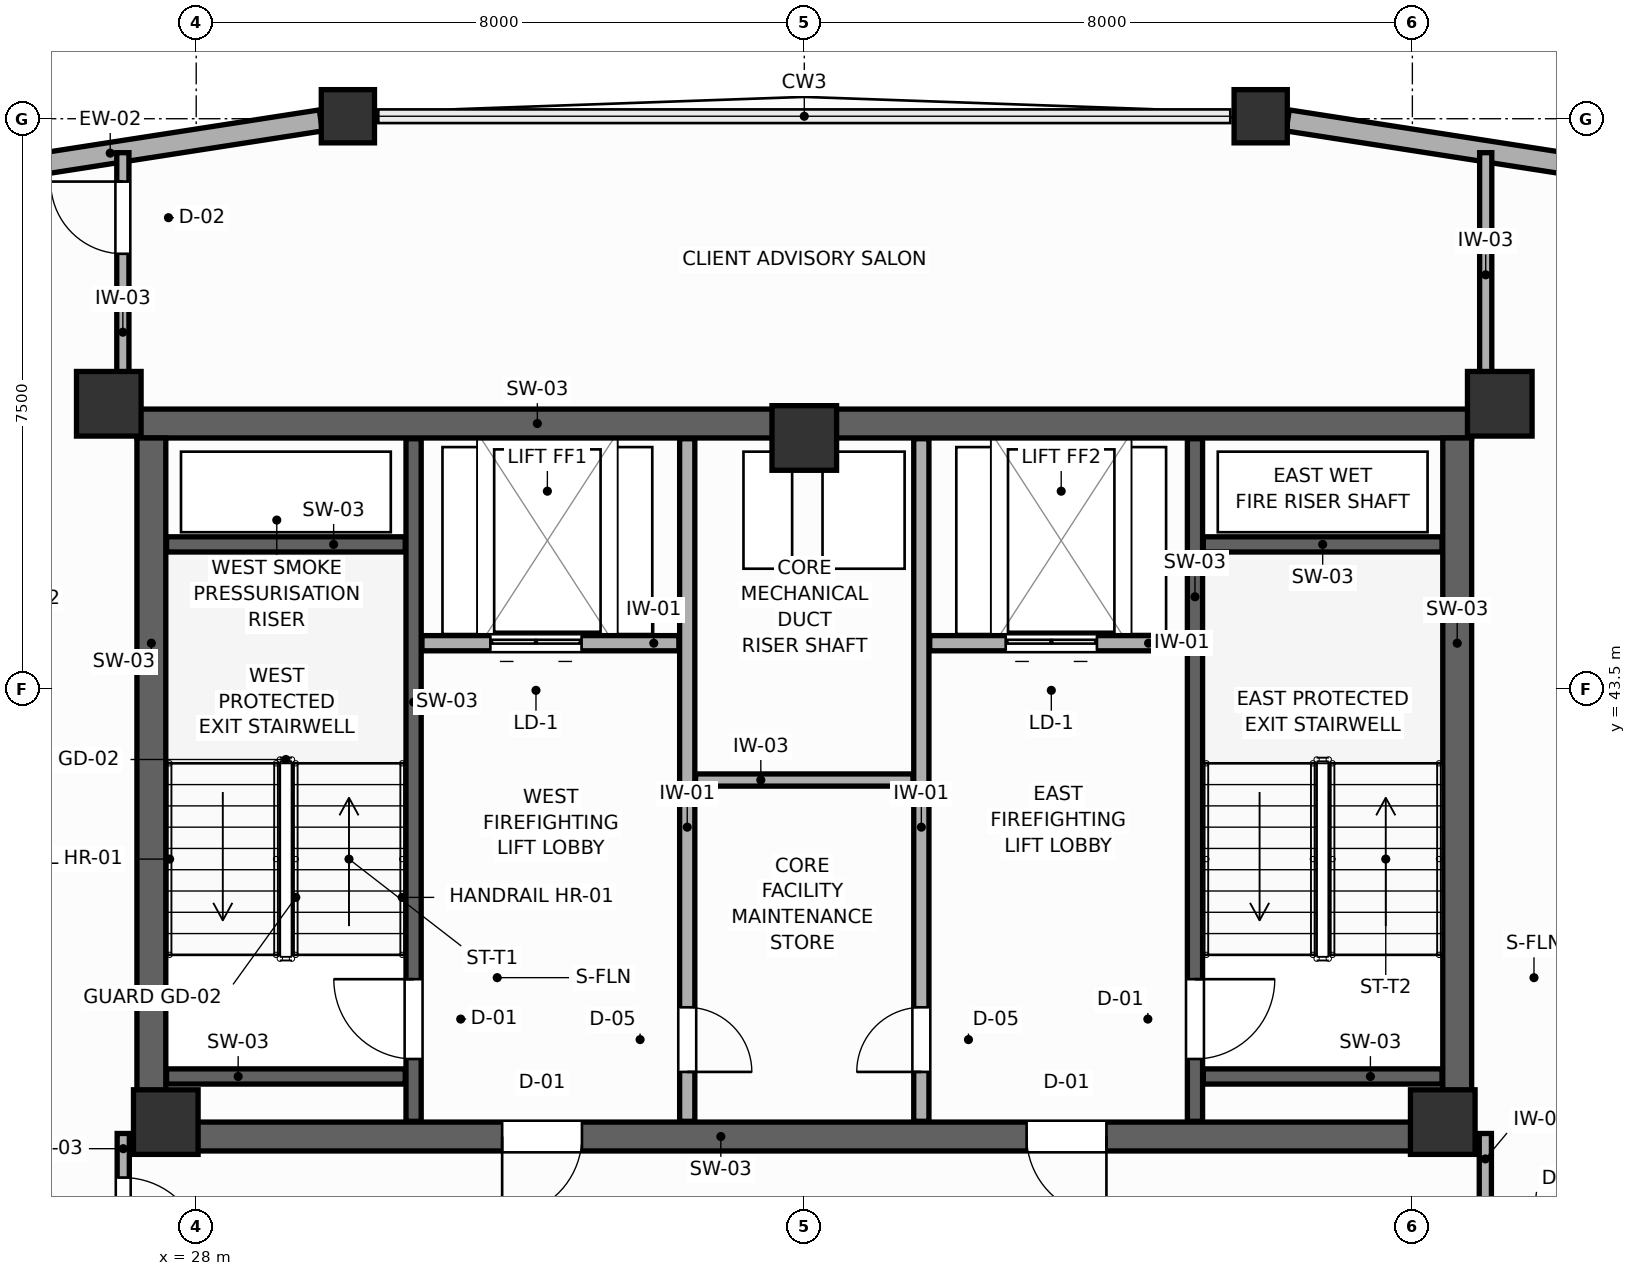
"""IFC4 building model, lengths in metres.
Left out: names, types, materials, properties, quantities, classifications, styles, units other than length and angle.
Written with IfcOpenShell. Run it as: python <this file> out.ifc"""

import sys

from ifc_helpers import new_model, si_unit, direction, frame, frame_2d, origin, origin_2d, place, context, subcontext, project, spatial, rectangle, extrude, source, transform, mapped, element, fill, save


model = new_model("IFC4")
c1 = context("Model", 3, precision=1e-05, world=origin(), true_north=direction((0.0, 1.0)))
c2 = subcontext(c1, "Body", "Model", "MODEL_VIEW")
j1 = project(units=[si_unit("LENGTHUNIT", "METRE"), si_unit("PLANEANGLEUNIT", "RADIAN")], contexts=[c1])
p1 = place(None, origin())
s1 = spatial("IfcSite", under=j1, at=p1, CompositionType="ELEMENT")
p2 = place(p1, origin())
s2 = spatial("IfcBuilding", under=s1, at=p2, CompositionType="ELEMENT")
p3 = place(p2, frame((0.0, 0.0, 246.6)))
s3 = spatial("IfcBuildingStorey", under=s2, at=p3, CompositionType="ELEMENT", Elevation=246.6)
p4 = place(p3, frame((27.22, 46.99, 0.0), z_axis=(0.0, 0.0, 1.0), x_axis=(1.0, 0.0, 0.0)))
e1 = element("IfcWall", 1, at=p4, inside=s3, PredefinedType="SHEAR", context=c2, shape_type="SweptSolid", body=[
    extrude(rectangle(XDim=17.56, YDim=0.38, at=frame_2d((8.78, 0.0))), origin(), (0.0, 0.0, 1.0), 3.6),
])
p5 = place(p3, frame((27.22, 37.61, 0.0), z_axis=(0.0, 0.0, 1.0), x_axis=(1.0, 0.0, 0.0)))
e2 = element("IfcWall", 2, at=p5, inside=s3, PredefinedType="SHEAR", context=c2, shape_type="SweptSolid", body=[
    extrude(rectangle(XDim=17.56, YDim=0.38, at=frame_2d((8.78, 0.0))), origin(), (0.0, 0.0, 1.0), 3.6),
])
p6 = place(p5, frame((4.805, 0.0, 0.0)))
e3 = element("IfcOpeningElement", 3, at=p6, cuts=e2, PredefinedType="OPENING", context=c2, shape_type="SweptSolid", body=[
    extrude(rectangle(XDim=1.05, YDim=2.1, at=frame_2d((0.525, 1.05))), frame((0.0, 0.2, 0.0), z_axis=(0.0, -1.0, 0.0), x_axis=(1.0, 0.0, 0.0)), (0.0, 0.0, 1.0), 0.4),
])
p7 = place(p5, frame((11.705, 0.0, 0.0)))
e4 = element("IfcOpeningElement", 4, at=p7, cuts=e2, PredefinedType="OPENING", context=c2, shape_type="SweptSolid", body=[
    extrude(rectangle(XDim=1.05, YDim=2.1, at=frame_2d((0.525, 1.05))), frame((0.0, 0.2, 0.0), z_axis=(0.0, -1.0, 0.0), x_axis=(1.0, 0.0, 0.0)), (0.0, 0.0, 1.0), 0.4),
])
for number, where, z_axis, x_axis in (
    (5, (27.41, 37.8, 0.0), (0.0, 0.0, 1.0), (0.0, 1.0, 0.0)),
    (6, (44.59, 37.8, 0.0), (0.0, 0.0, 1.0), (0.0, 1.0, 0.0)),
):
    element("IfcWall", number, at=place(p3, frame(where, z_axis=z_axis, x_axis=x_axis)), inside=s3, PredefinedType="SHEAR", context=c2, shape_type="SweptSolid", body=[
        extrude(rectangle(XDim=9.0, YDim=0.38, at=frame_2d((4.5, 0.0))), origin(), (0.0, 0.0, 1.0), 3.6),
    ])
m1 = source(origin(), c2, "Body", "SweptSolid", [
    extrude(rectangle(XDim=0.85, YDim=0.85, at=origin_2d()), origin(), (0.0, 0.0, 1.0), 3.6),
])
for number, where, z_axis, x_axis in (
    (7, (26.85, 47.25, 0.0), (0.0, 0.0, 1.0), (1.0, 0.0, 0.0)),
    (8, (45.15, 47.25, 0.0), (0.0, 0.0, 1.0), (1.0, 0.0, 0.0)),
    (9, (27.6, 37.8, 0.0), (0.0, 0.0, 1.0), (1.0, 0.0, 0.0)),
    (10, (44.4, 37.8, 0.0), (0.0, 0.0, 1.0), (1.0, 0.0, 0.0)),
    (11, (36.0, 46.8, 0.0), (0.0, 0.0, 1.0), (1.0, 0.0, 0.0)),
):
    element("IfcColumn", number, at=place(p3, frame(where, z_axis=z_axis, x_axis=x_axis)), inside=s3, PredefinedType="COLUMN", context=c2, shape_type="MappedRepresentation", body=[
        mapped(m1, transform((0.0, 0.0, 0.0), scale=1.0)),
    ])
m2 = source(origin(), c2, "Body", "SweptSolid", [
    extrude(rectangle(XDim=0.7, YDim=0.7, at=origin_2d()), origin(), (0.0, 0.0, 1.0), 3.6),
])
for number, where, z_axis, x_axis in (
    (12, (42.004, 51.033, 0.0), (0.0, 0.0, 1.0), (1.0, 0.0, 0.0)),
    (13, (29.996, 51.033, 0.0), (0.0, 0.0, 1.0), (1.0, 0.0, 0.0)),
):
    element("IfcColumn", number, at=place(p3, frame(where, z_axis=z_axis, x_axis=x_axis)), inside=s3, PredefinedType="COLUMN", context=c2, shape_type="MappedRepresentation", body=[
        mapped(m2, transform((0.0, 0.0, 0.0), scale=1.0)),
    ])
p8 = place(p3, frame((55.235, 48.979, 0.0), z_axis=(0.0, 0.0, 1.0), x_axis=(-0.988170476673, 0.153359411293, 0.0)))
e14 = element("IfcWall", 14, at=p8, inside=s3, PredefinedType="SOLIDWALL", context=c2, shape_type="SweptSolid", body=[
    extrude(rectangle(XDim=13.03, YDim=0.28, at=frame_2d((6.515, 0.0))), origin(), (0.0, 0.0, 1.0), 3.08),
])
p9 = place(p8, frame((5.79, 0.0, 0.75)))
e15 = element("IfcOpeningElement", 15, at=p9, cuts=e14, PredefinedType="OPENING", context=c2, shape_type="SweptSolid", body=[
    extrude(rectangle(XDim=1.45, YDim=1.65, at=frame_2d((0.725, 0.825))), frame((0.0, 0.15, 0.0), z_axis=(0.0, -1.0, 0.0), x_axis=(1.0, 0.0, 0.0)), (0.0, 0.0, 1.0), 0.3),
])
p10 = place(p3, frame((29.641, 50.978, 0.0), z_axis=(0.0, 0.0, 1.0), x_axis=(-0.988170476673, -0.153359411293, 0.0)))
e16 = element("IfcWall", 16, at=p10, inside=s3, PredefinedType="SOLIDWALL", context=c2, shape_type="SweptSolid", body=[
    extrude(rectangle(XDim=13.03, YDim=0.28, at=frame_2d((6.515, 0.0))), origin(), (0.0, 0.0, 1.0), 3.08),
])
p11 = place(p10, frame((5.79, 0.0, 0.75)))
e17 = element("IfcOpeningElement", 17, at=p11, cuts=e16, PredefinedType="OPENING", context=c2, shape_type="SweptSolid", body=[
    extrude(rectangle(XDim=1.45, YDim=1.65, at=frame_2d((0.725, 0.825))), frame((0.0, 0.15, 0.0), z_axis=(0.0, -1.0, 0.0), x_axis=(1.0, 0.0, 0.0)), (0.0, 0.0, 1.0), 0.3),
])
p12 = place(p3, frame((30.86, 37.81, 0.0), z_axis=(0.0, 0.0, 1.0), x_axis=(0.0, 1.0, 0.0)))
e18 = element("IfcWall", 18, at=p12, inside=s3, PredefinedType="SHEAR", context=c2, shape_type="SweptSolid", body=[
    extrude(rectangle(XDim=8.98, YDim=0.2, at=frame_2d((4.49, 0.0))), origin(), (0.0, 0.0, 1.0), 3.6),
])
p13 = place(p12, frame((0.82, 0.0, 0.0)))
e19 = element("IfcOpeningElement", 19, at=p13, cuts=e18, PredefinedType="OPENING", context=c2, shape_type="SweptSolid", body=[
    extrude(rectangle(XDim=1.05, YDim=2.1, at=frame_2d((0.525, 1.05))), frame((0.0, 0.11, 0.0), z_axis=(0.0, -1.0, 0.0), x_axis=(1.0, 0.0, 0.0)), (0.0, 0.0, 1.0), 0.22),
])
for number, where, z_axis, x_axis in (
    (20, (27.61, 45.4, 0.0), (0.0, 0.0, 1.0), (1.0, 0.0, 0.0)),
    (21, (27.61, 38.4, 0.0), (0.0, 0.0, 1.0), (1.0, 0.0, 0.0)),
):
    element("IfcWall", number, at=place(p3, frame(where, z_axis=z_axis, x_axis=x_axis)), inside=s3, PredefinedType="SHEAR", context=c2, shape_type="SweptSolid", body=[
        extrude(rectangle(XDim=3.14, YDim=0.2, at=frame_2d((1.57, 0.0))), origin(), (0.0, 0.0, 1.0), 3.6),
    ])
p14 = place(p3, frame((41.14, 37.81, 0.0), z_axis=(0.0, 0.0, 1.0), x_axis=(0.0, 1.0, 0.0)))
e22 = element("IfcWall", 22, at=p14, inside=s3, PredefinedType="SHEAR", context=c2, shape_type="SweptSolid", body=[
    extrude(rectangle(XDim=8.98, YDim=0.2, at=frame_2d((4.49, 0.0))), origin(), (0.0, 0.0, 1.0), 3.6),
])
p15 = place(p14, frame((0.82, 0.0, 0.0)))
e23 = element("IfcOpeningElement", 23, at=p15, cuts=e22, PredefinedType="OPENING", context=c2, shape_type="SweptSolid", body=[
    extrude(rectangle(XDim=1.05, YDim=2.1, at=frame_2d((0.525, 1.05))), frame((0.0, 0.11, 0.0), z_axis=(0.0, -1.0, 0.0), x_axis=(1.0, 0.0, 0.0)), (0.0, 0.0, 1.0), 0.22),
])
for number, where, z_axis, x_axis in (
    (24, (41.25, 45.4, 0.0), (0.0, 0.0, 1.0), (1.0, 0.0, 0.0)),
    (25, (41.25, 38.4, 0.0), (0.0, 0.0, 1.0), (1.0, 0.0, 0.0)),
):
    element("IfcWall", number, at=place(p3, frame(where, z_axis=z_axis, x_axis=x_axis)), inside=s3, PredefinedType="SHEAR", context=c2, shape_type="SweptSolid", body=[
        extrude(rectangle(XDim=3.14, YDim=0.2, at=frame_2d((1.57, 0.0))), origin(), (0.0, 0.0, 1.0), 3.6),
    ])
p16 = place(p3, frame((30.97, 44.1, 0.0), z_axis=(0.0, 0.0, 1.0), x_axis=(1.0, 0.0, 0.0)))
e26 = element("IfcWall", 26, at=p16, inside=s3, PredefinedType="PARTITIONING", context=c2, shape_type="SweptSolid", body=[
    extrude(rectangle(XDim=3.38, YDim=0.2, at=frame_2d((1.69, 0.0))), origin(), (0.0, 0.0, 1.0), 3.41),
])
p17 = place(p16, frame((0.9, 0.0, 0.0)))
e27 = element("IfcOpeningElement", 27, at=p17, cuts=e26, PredefinedType="OPENING", context=c2, shape_type="SweptSolid", body=[
    extrude(rectangle(XDim=1.2, YDim=2.1, at=frame_2d((0.6, 1.05))), frame((0.0, 0.11, 0.0), z_axis=(0.0, -1.0, 0.0), x_axis=(1.0, 0.0, 0.0)), (0.0, 0.0, 1.0), 0.22),
])
p18 = place(p3, frame((37.65, 44.1, 0.0), z_axis=(0.0, 0.0, 1.0), x_axis=(1.0, 0.0, 0.0)))
e28 = element("IfcWall", 28, at=p18, inside=s3, PredefinedType="PARTITIONING", context=c2, shape_type="SweptSolid", body=[
    extrude(rectangle(XDim=3.38, YDim=0.2, at=frame_2d((1.69, 0.0))), origin(), (0.0, 0.0, 1.0), 3.41),
])
p19 = place(p18, frame((1.0, 0.0, 0.0)))
e29 = element("IfcOpeningElement", 29, at=p19, cuts=e28, PredefinedType="OPENING", context=c2, shape_type="SweptSolid", body=[
    extrude(rectangle(XDim=1.2, YDim=2.1, at=frame_2d((0.6, 1.05))), frame((0.0, 0.11, 0.0), z_axis=(0.0, -1.0, 0.0), x_axis=(1.0, 0.0, 0.0)), (0.0, 0.0, 1.0), 0.22),
])
p20 = place(p3, frame((34.46, 37.81, 0.0), z_axis=(0.0, 0.0, 1.0), x_axis=(0.0, 1.0, 0.0)))
e30 = element("IfcWall", 30, at=p20, inside=s3, PredefinedType="PARTITIONING", context=c2, shape_type="SweptSolid", body=[
    extrude(rectangle(XDim=8.98, YDim=0.2, at=frame_2d((4.49, 0.0))), origin(), (0.0, 0.0, 1.0), 3.41),
])
p21 = place(p20, frame((0.65, 0.0, 0.0)))
e31 = element("IfcOpeningElement", 31, at=p21, cuts=e30, PredefinedType="OPENING", context=c2, shape_type="SweptSolid", body=[
    extrude(rectangle(XDim=0.85, YDim=2.05, at=frame_2d((0.425, 1.025))), frame((0.0, 0.11, 0.0), z_axis=(0.0, -1.0, 0.0), x_axis=(1.0, 0.0, 0.0)), (0.0, 0.0, 1.0), 0.22),
])
p22 = place(p3, frame((37.54, 37.81, 0.0), z_axis=(0.0, 0.0, 1.0), x_axis=(0.0, 1.0, 0.0)))
e32 = element("IfcWall", 32, at=p22, inside=s3, PredefinedType="PARTITIONING", context=c2, shape_type="SweptSolid", body=[
    extrude(rectangle(XDim=8.98, YDim=0.2, at=frame_2d((4.49, 0.0))), origin(), (0.0, 0.0, 1.0), 3.41),
])
p23 = place(p22, frame((0.65, 0.0, 0.0)))
e33 = element("IfcOpeningElement", 33, at=p23, cuts=e32, PredefinedType="OPENING", context=c2, shape_type="SweptSolid", body=[
    extrude(rectangle(XDim=0.85, YDim=2.05, at=frame_2d((0.425, 1.025))), frame((0.0, 0.11, 0.0), z_axis=(0.0, -1.0, 0.0), x_axis=(1.0, 0.0, 0.0)), (0.0, 0.0, 1.0), 0.22),
])
p24 = place(p3, frame((34.57, 42.3, 0.0), z_axis=(0.0, 0.0, 1.0), x_axis=(1.0, 0.0, 0.0)))
e34 = element("IfcWall", 34, at=p24, inside=s3, PredefinedType="PARTITIONING", context=c2, shape_type="SweptSolid", body=[
    extrude(rectangle(XDim=2.86, YDim=0.16, at=frame_2d((1.43, 0.0))), origin(), (0.0, 0.0, 1.0), 3.41),
])
p25 = place(p3, frame((27.04, 35.54, 0.0), z_axis=(0.0, 0.0, 1.0), x_axis=(0.0, 1.0, 0.0)))
e35 = element("IfcWall", 35, at=p25, inside=s3, PredefinedType="PARTITIONING", context=c2, shape_type="SweptSolid", body=[
    extrude(rectangle(XDim=2.11, YDim=0.16, at=frame_2d((1.055, 0.0))), origin(), (0.0, 0.0, 1.0), 3.41),
])
p26 = place(p25, frame((0.48, 0.0, 0.0)))
e36 = element("IfcOpeningElement", 36, at=p26, cuts=e35, PredefinedType="OPENING", context=c2, shape_type="SweptSolid", body=[
    extrude(rectangle(XDim=1.05, YDim=2.1, at=frame_2d((0.525, 1.05))), frame((0.0, 0.09, 0.0), z_axis=(0.0, -1.0, 0.0), x_axis=(1.0, 0.0, 0.0)), (0.0, 0.0, 1.0), 0.18),
])
p27 = place(p3, frame((44.96, 35.0, 0.0), z_axis=(0.0, 0.0, 1.0), x_axis=(0.0, 1.0, 0.0)))
e37 = element("IfcWall", 37, at=p27, inside=s3, PredefinedType="PARTITIONING", context=c2, shape_type="SweptSolid", body=[
    extrude(rectangle(XDim=2.65, YDim=0.16, at=frame_2d((1.325, 0.0))), origin(), (0.0, 0.0, 1.0), 3.41),
])
p28 = place(p27, frame((0.75, 0.0, 0.0)))
e38 = element("IfcOpeningElement", 38, at=p28, cuts=e37, PredefinedType="OPENING", context=c2, shape_type="SweptSolid", body=[
    extrude(rectangle(XDim=1.05, YDim=2.1, at=frame_2d((0.525, 1.05))), frame((0.0, 0.09, 0.0), z_axis=(0.0, -1.0, 0.0), x_axis=(1.0, 0.0, 0.0)), (0.0, 0.0, 1.0), 0.18),
])
p29 = place(p3, frame((27.035, 47.34, 0.0), z_axis=(0.0, 0.0, 1.0), x_axis=(0.0, 1.0, 0.0)))
e39 = element("IfcWall", 39, at=p29, inside=s3, PredefinedType="PARTITIONING", context=c2, shape_type="SweptSolid", body=[
    extrude(rectangle(XDim=3.213, YDim=0.16, at=frame_2d((1.606, 0.0))), origin(), (0.0, 0.0, 1.0), 3.41),
])
p30 = place(p29, frame((1.883, 0.0, 0.0)))
e40 = element("IfcOpeningElement", 40, at=p30, cuts=e39, PredefinedType="OPENING", context=c2, shape_type="SweptSolid", body=[
    extrude(rectangle(XDim=0.95, YDim=2.05, at=frame_2d((0.475, 1.025))), frame((0.0, 0.09, 0.0), z_axis=(0.0, -1.0, 0.0), x_axis=(1.0, 0.0, 0.0)), (0.0, 0.0, 1.0), 0.18),
])
p31 = place(p3, frame((44.965, 47.34, 0.0), z_axis=(0.0, 0.0, 1.0), x_axis=(0.0, 1.0, 0.0)))
e41 = element("IfcWall", 41, at=p31, inside=s3, PredefinedType="PARTITIONING", context=c2, shape_type="SweptSolid", body=[
    extrude(rectangle(XDim=3.213, YDim=0.16, at=frame_2d((1.606, 0.0))), origin(), (0.0, 0.0, 1.0), 3.41),
])
p32 = place(p13, origin())
e42 = element("IfcDoor", 42, at=p32, inside=s3, OperationType="SINGLE_SWING_RIGHT", PredefinedType="DOOR", context=c2, shape_type="SweptSolid", body=[
    extrude(rectangle(XDim=1.05, YDim=2.1, at=frame_2d((0.525, 1.05))), frame((0.0, 0.025, 0.0), z_axis=(0.0, -1.0, 0.0), x_axis=(1.0, 0.0, 0.0)), (0.0, 0.0, 1.0), 0.05),
])
fill(e19, e42)
p33 = place(p15, frame((1.05, 0.0, 0.0), z_axis=(0.0, 0.0, 1.0), x_axis=(-1.0, 0.0, 0.0)))
e43 = element("IfcDoor", 43, at=p33, inside=s3, OperationType="SINGLE_SWING_LEFT", PredefinedType="DOOR", context=c2, shape_type="SweptSolid", body=[
    extrude(rectangle(XDim=1.05, YDim=2.1, at=frame_2d((0.525, 1.05))), frame((0.0, 0.025, 0.0), z_axis=(0.0, -1.0, 0.0), x_axis=(1.0, 0.0, 0.0)), (0.0, 0.0, 1.0), 0.05),
])
fill(e23, e43)
p34 = place(p17, origin())
e44 = element("IfcDoor", 44, at=p34, inside=s3, OperationType="DOUBLE_DOOR_SLIDING", PredefinedType="DOOR", context=c2, shape_type="SweptSolid", body=[
    extrude(rectangle(XDim=1.2, YDim=2.1, at=frame_2d((0.6, 1.05))), frame((0.0, 0.025, 0.0), z_axis=(0.0, -1.0, 0.0), x_axis=(1.0, 0.0, 0.0)), (0.0, 0.0, 1.0), 0.05),
])
fill(e27, e44)
p35 = place(p19, origin())
e45 = element("IfcDoor", 45, at=p35, inside=s3, OperationType="DOUBLE_DOOR_SLIDING", PredefinedType="DOOR", context=c2, shape_type="SweptSolid", body=[
    extrude(rectangle(XDim=1.2, YDim=2.1, at=frame_2d((0.6, 1.05))), frame((0.0, 0.025, 0.0), z_axis=(0.0, -1.0, 0.0), x_axis=(1.0, 0.0, 0.0)), (0.0, 0.0, 1.0), 0.05),
])
fill(e29, e45)
p36 = place(p21, frame((0.85, 0.0, 0.0), z_axis=(0.0, 0.0, 1.0), x_axis=(-1.0, 0.0, 0.0)))
e46 = element("IfcDoor", 46, at=p36, inside=s3, OperationType="SINGLE_SWING_RIGHT", PredefinedType="DOOR", context=c2, shape_type="SweptSolid", body=[
    extrude(rectangle(XDim=0.85, YDim=2.05, at=frame_2d((0.425, 1.025))), frame((0.0, 0.025, 0.0), z_axis=(0.0, -1.0, 0.0), x_axis=(1.0, 0.0, 0.0)), (0.0, 0.0, 1.0), 0.05),
])
fill(e31, e46)
p37 = place(p23, origin())
e47 = element("IfcDoor", 47, at=p37, inside=s3, OperationType="SINGLE_SWING_LEFT", PredefinedType="DOOR", context=c2, shape_type="SweptSolid", body=[
    extrude(rectangle(XDim=0.85, YDim=2.05, at=frame_2d((0.425, 1.025))), frame((0.0, 0.025, 0.0), z_axis=(0.0, -1.0, 0.0), x_axis=(1.0, 0.0, 0.0)), (0.0, 0.0, 1.0), 0.05),
])
fill(e33, e47)
p38 = place(p26, frame((1.05, 0.0, 0.0), z_axis=(0.0, 0.0, 1.0), x_axis=(-1.0, 0.0, 0.0)))
e48 = element("IfcDoor", 48, at=p38, inside=s3, OperationType="SINGLE_SWING_RIGHT", PredefinedType="DOOR", context=c2, shape_type="SweptSolid", body=[
    extrude(rectangle(XDim=1.05, YDim=2.1, at=frame_2d((0.525, 1.05))), frame((0.0, 0.025, 0.0), z_axis=(0.0, -1.0, 0.0), x_axis=(1.0, 0.0, 0.0)), (0.0, 0.0, 1.0), 0.05),
])
fill(e36, e48)
p39 = place(p30, origin())
e49 = element("IfcDoor", 49, at=p39, inside=s3, OperationType="SINGLE_SWING_RIGHT", PredefinedType="DOOR", context=c2, shape_type="SweptSolid", body=[
    extrude(rectangle(XDim=0.95, YDim=2.05, at=frame_2d((0.475, 1.025))), frame((0.0, 0.025, 0.0), z_axis=(0.0, -1.0, 0.0), x_axis=(1.0, 0.0, 0.0)), (0.0, 0.0, 1.0), 0.05),
])
fill(e40, e49)
p40 = place(p6, frame((1.05, 0.0, 0.0), z_axis=(0.0, 0.0, 1.0), x_axis=(-1.0, 0.0, 0.0)))
e50 = element("IfcDoor", 50, at=p40, inside=s3, OperationType="SINGLE_SWING_RIGHT", PredefinedType="DOOR", context=c2, shape_type="SweptSolid", body=[
    extrude(rectangle(XDim=1.05, YDim=2.1, at=frame_2d((0.525, 1.05))), frame((0.0, 0.025, 0.0), z_axis=(0.0, -1.0, 0.0), x_axis=(1.0, 0.0, 0.0)), (0.0, 0.0, 1.0), 0.05),
])
fill(e3, e50)
p41 = place(p7, frame((1.05, 0.0, 0.0), z_axis=(0.0, 0.0, 1.0), x_axis=(-1.0, 0.0, 0.0)))
e51 = element("IfcDoor", 51, at=p41, inside=s3, OperationType="SINGLE_SWING_LEFT", PredefinedType="DOOR", context=c2, shape_type="SweptSolid", body=[
    extrude(rectangle(XDim=1.05, YDim=2.1, at=frame_2d((0.525, 1.05))), frame((0.0, 0.025, 0.0), z_axis=(0.0, -1.0, 0.0), x_axis=(1.0, 0.0, 0.0)), (0.0, 0.0, 1.0), 0.05),
])
fill(e4, e51)
save(model, sys.argv[1])
